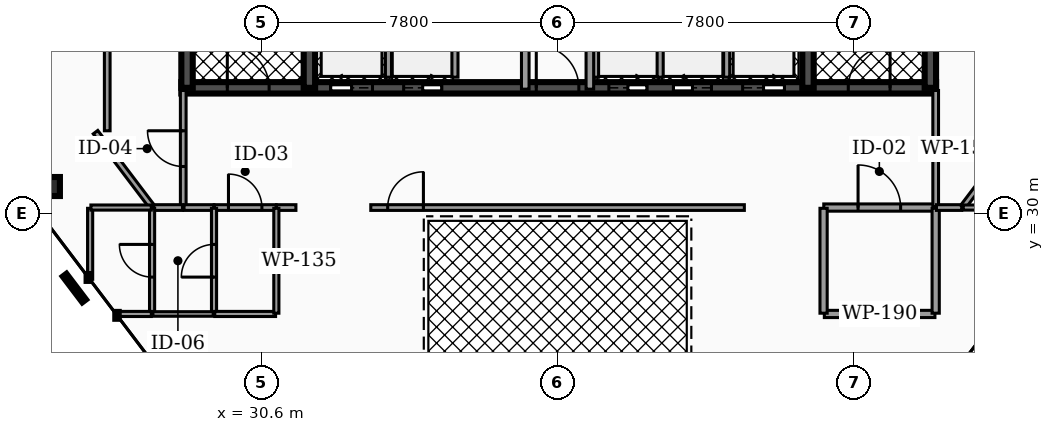
"""IFC4 building model, lengths in metres.
Left out: names, types, materials, properties, quantities, classifications, styles, units other than length and angle.
Written with IfcOpenShell. Run it as: python <this file> out.ifc"""

import sys

from ifc_helpers import new_model, si_unit, direction, frame, frame_2d, origin, origin_2d, place, context, subcontext, project, spatial, rectangle, hollow_rectangle, extrude, element, fill, save


model = new_model("IFC4")
c1 = context("Model", 3, precision=1e-05, world=origin(), true_north=direction((0.0, 1.0)))
c2 = subcontext(c1, "Body", "Model", "MODEL_VIEW")
j1 = project(units=[si_unit("LENGTHUNIT", "METRE"), si_unit("PLANEANGLEUNIT", "RADIAN")], contexts=[c1])
p1 = place(None, origin())
s1 = spatial("IfcSite", under=j1, at=p1, CompositionType="ELEMENT")
p2 = place(p1, origin())
s2 = spatial("IfcBuilding", under=s1, at=p2, CompositionType="ELEMENT")
p3 = place(p2, frame((0.0, 0.0, 249.56)))
s3 = spatial("IfcBuildingStorey", under=s2, at=p3, CompositionType="ELEMENT", Elevation=249.56)
p4 = place(p3, frame((28.5, 33.3, 0.0), z_axis=(0.0, 0.0, 1.0), x_axis=(1.0, 0.0, 0.0)))
e1 = element("IfcWall", 1, at=p4, inside=s3, PredefinedType="SHEAR", context=c2, shape_type="SweptSolid", body=[
    extrude(rectangle(XDim=19.86, YDim=0.3, at=frame_2d((9.93, 0.0))), origin(), (0.0, 0.0, 1.0), 3.05),
])
p5 = place(p4, frame((3.93, 0.0, 0.0)))
e2 = element("IfcOpeningElement", 2, at=p5, cuts=e1, PredefinedType="OPENING", context=c2, shape_type="SweptSolid", body=[
    extrude(rectangle(XDim=1.1, YDim=2.15, at=frame_2d((0.55, 1.075))), frame((0.0, 0.16, 0.0), z_axis=(0.0, -1.0, 0.0), x_axis=(1.0, 0.0, 0.0)), (0.0, 0.0, 1.0), 0.32),
])
p6 = place(p4, frame((14.77, 0.0, 0.0)))
e3 = element("IfcOpeningElement", 3, at=p6, cuts=e1, PredefinedType="OPENING", context=c2, shape_type="SweptSolid", body=[
    extrude(rectangle(XDim=1.1, YDim=2.15, at=frame_2d((0.55, 1.075))), frame((0.0, 0.16, 0.0), z_axis=(0.0, -1.0, 0.0), x_axis=(1.0, 0.0, 0.0)), (0.0, 0.0, 1.0), 0.32),
])
p7 = place(p4, frame((11.25, 0.0, 0.0)))
e4 = element("IfcOpeningElement", 4, at=p7, cuts=e1, PredefinedType="OPENING", context=c2, shape_type="SweptSolid", body=[
    extrude(rectangle(XDim=1.0, YDim=2.1, at=frame_2d((0.5, 1.05))), frame((0.0, 0.16, 0.0), z_axis=(0.0, -1.0, 0.0), x_axis=(1.0, 0.0, 0.0)), (0.0, 0.0, 1.0), 0.32),
])
p8 = place(p4, frame((12.95, 0.0, 0.0)))
e5 = element("IfcOpeningElement", 5, at=p8, cuts=e1, PredefinedType="OPENING", context=c2, shape_type="SweptSolid", body=[
    extrude(rectangle(XDim=1.0, YDim=2.1, at=frame_2d((0.5, 1.05))), frame((0.0, 0.16, 0.0), z_axis=(0.0, -1.0, 0.0), x_axis=(1.0, 0.0, 0.0)), (0.0, 0.0, 1.0), 0.32),
])
p9 = place(p4, frame((5.85, 0.0, 0.0)))
e6 = element("IfcOpeningElement", 6, at=p9, cuts=e1, PredefinedType="OPENING", context=c2, shape_type="SweptSolid", body=[
    extrude(rectangle(XDim=1.0, YDim=2.1, at=frame_2d((0.5, 1.05))), frame((0.0, 0.16, 0.0), z_axis=(0.0, -1.0, 0.0), x_axis=(1.0, 0.0, 0.0)), (0.0, 0.0, 1.0), 0.32),
])
p10 = place(p4, frame((1.21, 0.0, 0.0)))
e7 = element("IfcOpeningElement", 7, at=p10, cuts=e1, PredefinedType="OPENING", context=c2, shape_type="SweptSolid", body=[
    extrude(rectangle(XDim=1.1, YDim=2.2, at=frame_2d((0.55, 1.1))), frame((0.0, 0.16, 0.0), z_axis=(0.0, -1.0, 0.0), x_axis=(1.0, 0.0, 0.0)), (0.0, 0.0, 1.0), 0.32),
])
p11 = place(p4, frame((9.34, 0.0, 0.0)))
e8 = element("IfcOpeningElement", 8, at=p11, cuts=e1, PredefinedType="OPENING", context=c2, shape_type="SweptSolid", body=[
    extrude(rectangle(XDim=1.12, YDim=2.05, at=frame_2d((0.56, 1.025))), frame((0.0, 0.16, 0.0), z_axis=(0.0, -1.0, 0.0), x_axis=(1.0, 0.0, 0.0)), (0.0, 0.0, 1.0), 0.32),
])
p12 = place(p4, frame((17.55, 0.0, 0.0)))
e9 = element("IfcOpeningElement", 9, at=p12, cuts=e1, PredefinedType="OPENING", context=c2, shape_type="SweptSolid", body=[
    extrude(rectangle(XDim=1.1, YDim=2.2, at=frame_2d((0.55, 1.1))), frame((0.0, 0.16, 0.0), z_axis=(0.0, -1.0, 0.0), x_axis=(1.0, 0.0, 0.0)), (0.0, 0.0, 1.0), 0.32),
])
for number, where, z_axis, x_axis in (
    (10, (28.65, 33.3, 0.0), (0.0, 0.0, 1.0), (0.0, 1.0, 0.0)),
    (11, (31.87, 33.3, 0.0), (0.0, 0.0, 1.0), (0.0, 1.0, 0.0)),
    (12, (44.99, 33.3, 0.0), (0.0, 0.0, 1.0), (0.0, 1.0, 0.0)),
    (13, (48.21, 33.3, 0.0), (0.0, 0.0, 1.0), (0.0, 1.0, 0.0)),
):
    element("IfcWall", number, at=place(p3, frame(where, z_axis=z_axis, x_axis=x_axis)), inside=s3, PredefinedType="SHEAR", context=c2, shape_type="SweptSolid", body=[
        extrude(rectangle(XDim=10.1, YDim=0.3, at=frame_2d((5.05, 0.0))), origin(), (0.0, 0.0, 1.0), 3.05),
    ])
p13 = place(p3, frame((25.055, 30.704, 0.0), z_axis=(0.028068274042, 0.034145735089, 0.99902264277), x_axis=(-0.772504370212, 0.635009447177, 0.0)))
e14 = element("IfcColumn", 14, at=p13, inside=s3, PredefinedType="COLUMN", context=c2, shape_type="SweptSolid", body=[
    extrude(hollow_rectangle(XDim=0.5, YDim=0.5, WallThickness=0.025, at=origin_2d()), origin(), (0.0, 0.0, 1.0), 3.053),
])
for number, where, z_axis, x_axis in (
    (15, (33.95, 33.58, 0.0), (0.0, 0.0, 1.0), (0.0, 1.0, 0.0)),
    (16, (42.85, 33.58, 0.0), (0.0, 0.0, 1.0), (0.0, 1.0, 0.0)),
):
    element("IfcWall", number, at=place(p3, frame(where, z_axis=z_axis, x_axis=x_axis)), inside=s3, PredefinedType="SOLIDWALL", context=c2, shape_type="SweptSolid", body=[
        extrude(rectangle(XDim=2.45, YDim=0.16, at=frame_2d((1.225, 0.0))), origin(), (0.0, 0.0, 1.0), 3.05),
    ])
for number, where, z_axis, x_axis in (
    (17, (39.4, 33.58, 0.0), (0.0, 0.0, 1.0), (0.0, 1.0, 0.0)),
    (18, (41.1, 33.58, 0.0), (0.0, 0.0, 1.0), (0.0, 1.0, 0.0)),
    (19, (35.7, 33.58, 0.0), (0.0, 0.0, 1.0), (0.0, 1.0, 0.0)),
):
    element("IfcWall", number, at=place(p3, frame(where, z_axis=z_axis, x_axis=x_axis)), inside=s3, PredefinedType="SOLIDWALL", context=c2, shape_type="SweptSolid", body=[
        extrude(rectangle(XDim=2.25, YDim=0.16, at=frame_2d((1.125, 0.0))), origin(), (0.0, 0.0, 1.0), 3.05),
    ])
p14 = place(p3, frame((37.55, 33.265, 0.0), z_axis=(0.0, 0.0, 1.0), x_axis=(0.0, 1.0, 0.0)))
e20 = element("IfcWall", 20, at=p14, inside=s3, PredefinedType="PARTITIONING", context=c2, shape_type="SweptSolid", body=[
    extrude(rectangle(XDim=3.615, YDim=0.2, at=frame_2d((1.808, 0.0))), origin(), (0.0, 0.0, 1.0), 2.2),
])
p15 = place(p14, frame((1.367, 0.0, 0.0)))
e21 = element("IfcOpeningElement", 21, at=p15, cuts=e20, PredefinedType="OPENING", context=c2, shape_type="SweptSolid", body=[
    extrude(rectangle(XDim=0.88, YDim=2.05, at=frame_2d((0.44, 1.025))), frame((0.0, 0.11, 0.0), z_axis=(0.0, -1.0, 0.0), x_axis=(1.0, 0.0, 0.0)), (0.0, 0.0, 1.0), 0.22),
])
p16 = place(p3, frame((39.25, 33.265, 0.0), z_axis=(0.0, 0.0, 1.0), x_axis=(0.0, 1.0, 0.0)))
e22 = element("IfcWall", 22, at=p16, inside=s3, PredefinedType="PARTITIONING", context=c2, shape_type="SweptSolid", body=[
    extrude(rectangle(XDim=3.615, YDim=0.2, at=frame_2d((1.808, 0.0))), origin(), (0.0, 0.0, 1.0), 2.2),
])
p17 = place(p3, frame((45.405, 30.15, 0.0), z_axis=(0.0, 0.0, 1.0), x_axis=(1.0, 0.0, 0.0)))
e23 = element("IfcWall", 23, at=p17, inside=s3, PredefinedType="PARTITIONING", context=c2, shape_type="SweptSolid", body=[
    extrude(rectangle(XDim=2.925, YDim=0.19, at=frame_2d((1.462, 0.0))), origin(), (0.0, 0.0, 1.0), 2.2),
])
p18 = place(p17, frame((0.903, 0.0, 0.0)))
e24 = element("IfcOpeningElement", 24, at=p18, cuts=e23, PredefinedType="OPENING", context=c2, shape_type="SweptSolid", body=[
    extrude(rectangle(XDim=1.12, YDim=2.05, at=frame_2d((0.56, 1.025))), frame((0.0, 0.105, 0.0), z_axis=(0.0, -1.0, 0.0), x_axis=(1.0, 0.0, 0.0)), (0.0, 0.0, 1.0), 0.21),
])
p19 = place(p3, frame((28.55, 30.17, 0.0), z_axis=(0.0, 0.0, 1.0), x_axis=(0.0, 1.0, 0.0)))
e25 = element("IfcWall", 25, at=p19, inside=s3, PredefinedType="PARTITIONING", context=c2, shape_type="SweptSolid", body=[
    extrude(rectangle(XDim=3.06, YDim=0.15, at=frame_2d((1.53, 0.0))), origin(), (0.0, 0.0, 1.0), 2.2),
])
p20 = place(p19, frame((1.06, 0.0, 0.0)))
e26 = element("IfcOpeningElement", 26, at=p20, cuts=e25, PredefinedType="OPENING", context=c2, shape_type="SweptSolid", body=[
    extrude(rectangle(XDim=0.94, YDim=2.05, at=frame_2d((0.47, 1.025))), frame((0.0, 0.085, 0.0), z_axis=(0.0, -1.0, 0.0), x_axis=(1.0, 0.0, 0.0)), (0.0, 0.0, 1.0), 0.17),
])
p21 = place(p3, frame((48.35, 30.17, 0.0), z_axis=(0.0, 0.0, 1.0), x_axis=(0.0, 1.0, 0.0)))
e27 = element("IfcWall", 27, at=p21, inside=s3, PredefinedType="PARTITIONING", context=c2, shape_type="SweptSolid", body=[
    extrude(rectangle(XDim=3.06, YDim=0.15, at=frame_2d((1.53, 0.0))), origin(), (0.0, 0.0, 1.0), 2.2),
])
p22 = place(p3, frame((29.365, 30.15, 0.0), z_axis=(0.0, 0.0, 1.0), x_axis=(1.0, 0.0, 0.0)))
e28 = element("IfcWall", 28, at=p22, inside=s3, PredefinedType="PARTITIONING", context=c2, shape_type="SweptSolid", body=[
    extrude(rectangle(XDim=1.63, YDim=0.15, at=frame_2d((0.815, 0.0))), origin(), (0.0, 0.0, 1.0), 2.2),
])
p23 = place(p22, frame((0.375, 0.0, 0.0)))
e29 = element("IfcOpeningElement", 29, at=p23, cuts=e28, PredefinedType="OPENING", context=c2, shape_type="SweptSolid", body=[
    extrude(rectangle(XDim=0.88, YDim=2.05, at=frame_2d((0.44, 1.025))), frame((0.0, 0.085, 0.0), z_axis=(0.0, -1.0, 0.0), x_axis=(1.0, 0.0, 0.0)), (0.0, 0.0, 1.0), 0.17),
])
p24 = place(p3, frame((28.57, 30.15, 0.0), z_axis=(0.0, 0.0, 1.0), x_axis=(1.0, 0.0, 0.0)))
e30 = element("IfcWall", 30, at=p24, inside=s3, PredefinedType="PARTITIONING", context=c2, shape_type="SweptSolid", body=[
    extrude(rectangle(XDim=0.785, YDim=0.15, at=frame_2d((0.393, 0.0))), origin(), (0.0, 0.0, 1.0), 2.2),
])
p25 = place(p3, frame((33.485, 30.15, 0.0), z_axis=(0.0, 0.0, 1.0), x_axis=(1.0, 0.0, 0.0)))
e31 = element("IfcWall", 31, at=p25, inside=s3, PredefinedType="PARTITIONING", context=c2, shape_type="SweptSolid", body=[
    extrude(rectangle(XDim=9.83, YDim=0.15, at=frame_2d((4.915, 0.0))), origin(), (0.0, 0.0, 1.0), 2.2),
])
p26 = place(p25, frame((0.445, 0.0, 0.0)))
e32 = element("IfcOpeningElement", 32, at=p26, cuts=e31, PredefinedType="OPENING", context=c2, shape_type="SweptSolid", body=[
    extrude(rectangle(XDim=0.94, YDim=2.05, at=frame_2d((0.47, 1.025))), frame((0.0, 0.085, 0.0), z_axis=(0.0, -1.0, 0.0), x_axis=(1.0, 0.0, 0.0)), (0.0, 0.0, 1.0), 0.17),
])
p27 = place(p3, frame((31.005, 30.15, 0.0), z_axis=(0.0, 0.0, 1.0), x_axis=(1.0, 0.0, 0.0)))
e33 = element("IfcWall", 33, at=p27, inside=s3, PredefinedType="PARTITIONING", context=c2, shape_type="SweptSolid", body=[
    extrude(rectangle(XDim=0.51, YDim=0.15, at=frame_2d((0.255, 0.0))), origin(), (0.0, 0.0, 1.0), 2.2),
])
p28 = place(p3, frame((45.42, 27.35, 0.0), z_axis=(0.0, 0.0, 1.0), x_axis=(1.0, 0.0, 0.0)))
e34 = element("IfcWall", 34, at=p28, inside=s3, PredefinedType="PARTITIONING", context=c2, shape_type="SweptSolid", body=[
    extrude(rectangle(XDim=2.91, YDim=0.19, at=frame_2d((1.455, 0.0))), origin(), (0.0, 0.0, 1.0), 2.2),
])
for number, where, z_axis, x_axis in (
    (35, (45.4, 27.37, 0.0), (0.0, 0.0, 1.0), (0.0, 1.0, 0.0)),
    (36, (48.35, 27.37, 0.0), (0.0, 0.0, 1.0), (0.0, 1.0, 0.0)),
):
    element("IfcWall", number, at=place(p3, frame(where, z_axis=z_axis, x_axis=x_axis)), inside=s3, PredefinedType="PARTITIONING", context=c2, shape_type="SweptSolid", body=[
        extrude(rectangle(XDim=2.76, YDim=0.19, at=frame_2d((1.38, 0.0))), origin(), (0.0, 0.0, 1.0), 2.2),
    ])
p29 = place(p3, frame((27.765, 30.15, 0.0), z_axis=(0.0, 0.0, 1.0), x_axis=(1.0, 0.0, 0.0)))
e37 = element("IfcWall", 37, at=p29, inside=s3, PredefinedType="PARTITIONING", context=c2, shape_type="SweptSolid", body=[
    extrude(rectangle(XDim=0.765, YDim=0.15, at=frame_2d((0.383, 0.0))), origin(), (0.0, 0.0, 1.0), 2.2),
])
p30 = place(p3, frame((48.37, 30.15, 0.0), z_axis=(0.0, 0.0, 1.0), x_axis=(1.0, 0.0, 0.0)))
e38 = element("IfcWall", 38, at=p30, inside=s3, PredefinedType="PARTITIONING", context=c2, shape_type="SweptSolid", body=[
    extrude(rectangle(XDim=0.665, YDim=0.15, at=frame_2d((0.333, 0.0))), origin(), (0.0, 0.0, 1.0), 2.2),
])
p31 = place(p3, frame((26.242, 32.134, 0.0), z_axis=(0.0, 0.0, 1.0), x_axis=(0.603806281462, -0.797131089889, 0.0)))
e39 = element("IfcWall", 39, at=p31, inside=s3, PredefinedType="PARTITIONING", context=c2, shape_type="SweptSolid", body=[
    extrude(rectangle(XDim=2.469, YDim=0.15, at=frame_2d((1.234, 0.0))), origin(), (0.0, 0.0, 1.0), 2.2),
])
p32 = place(p3, frame((26.55, 32.17, 0.0), z_axis=(0.0, 0.0, 1.0), x_axis=(0.0, 1.0, 0.0)))
e40 = element("IfcWall", 40, at=p32, inside=s3, PredefinedType="PARTITIONING", context=c2, shape_type="SweptSolid", body=[
    extrude(rectangle(XDim=11.38, YDim=0.15, at=frame_2d((5.69, 0.0))), origin(), (0.0, 0.0, 1.0), 2.2),
])
p33 = place(p32, frame((5.22, 0.0, 0.0)))
e41 = element("IfcOpeningElement", 41, at=p33, cuts=e40, PredefinedType="OPENING", context=c2, shape_type="SweptSolid", body=[
    extrude(rectangle(XDim=0.94, YDim=2.05, at=frame_2d((0.47, 1.025))), frame((0.0, 0.085, 0.0), z_axis=(0.0, -1.0, 0.0), x_axis=(1.0, 0.0, 0.0)), (0.0, 0.0, 1.0), 0.17),
])
p34 = place(p3, frame((49.067, 30.166, 0.0), z_axis=(0.0, 0.0, 1.0), x_axis=(0.603916229015, 0.797047795513, 0.0)))
e42 = element("IfcWall", 42, at=p34, inside=s3, PredefinedType="PARTITIONING", context=c2, shape_type="SweptSolid", body=[
    extrude(rectangle(XDim=2.489, YDim=0.15, at=frame_2d((1.245, 0.0))), origin(), (0.0, 0.0, 1.0), 2.2),
])
p35 = place(p3, frame((29.36, 27.37, 0.0), z_axis=(0.0, 0.0, 1.0), x_axis=(0.0, 1.0, 0.0)))
e43 = element("IfcWall", 43, at=p35, inside=s3, PredefinedType="PARTITIONING", context=c2, shape_type="SweptSolid", body=[
    extrude(rectangle(XDim=2.76, YDim=0.135, at=frame_2d((1.38, 0.0))), origin(), (0.0, 0.0, 1.0), 2.2),
])
p36 = place(p35, frame((0.95, 0.0, 0.0)))
e44 = element("IfcOpeningElement", 44, at=p36, cuts=e43, PredefinedType="OPENING", context=c2, shape_type="SweptSolid", body=[
    extrude(rectangle(XDim=0.86, YDim=2.05, at=frame_2d((0.43, 1.025))), frame((0.0, 0.077, 0.0), z_axis=(0.0, -1.0, 0.0), x_axis=(1.0, 0.0, 0.0)), (0.0, 0.0, 1.0), 0.155),
])
p37 = place(p3, frame((29.38, 27.35, 0.0), z_axis=(0.0, 0.0, 1.0), x_axis=(1.0, 0.0, 0.0)))
e45 = element("IfcWall", 45, at=p37, inside=s3, PredefinedType="PARTITIONING", context=c2, shape_type="SweptSolid", body=[
    extrude(rectangle(XDim=1.6, YDim=0.135, at=frame_2d((0.8, 0.0))), origin(), (0.0, 0.0, 1.0), 2.2),
])
p38 = place(p3, frame((31.0, 27.37, 0.0), z_axis=(0.0, 0.0, 1.0), x_axis=(0.0, 1.0, 0.0)))
e46 = element("IfcWall", 46, at=p38, inside=s3, PredefinedType="PARTITIONING", context=c2, shape_type="SweptSolid", body=[
    extrude(rectangle(XDim=2.76, YDim=0.135, at=frame_2d((1.38, 0.0))), origin(), (0.0, 0.0, 1.0), 2.2),
])
p39 = place(p3, frame((27.73, 27.37, 0.0), z_axis=(0.0, 0.0, 1.0), x_axis=(0.0, 1.0, 0.0)))
e47 = element("IfcWall", 47, at=p39, inside=s3, PredefinedType="PARTITIONING", context=c2, shape_type="SweptSolid", body=[
    extrude(rectangle(XDim=2.76, YDim=0.135, at=frame_2d((1.38, 0.0))), origin(), (0.0, 0.0, 1.0), 2.2),
])
p40 = place(p39, frame((0.95, 0.0, 0.0)))
e48 = element("IfcOpeningElement", 48, at=p40, cuts=e47, PredefinedType="OPENING", context=c2, shape_type="SweptSolid", body=[
    extrude(rectangle(XDim=0.86, YDim=2.05, at=frame_2d((0.43, 1.025))), frame((0.0, 0.077, 0.0), z_axis=(0.0, -1.0, 0.0), x_axis=(1.0, 0.0, 0.0)), (0.0, 0.0, 1.0), 0.155),
])
p41 = place(p3, frame((26.795, 27.35, 0.0), z_axis=(0.0, 0.0, 1.0), x_axis=(1.0, 0.0, 0.0)))
e49 = element("IfcWall", 49, at=p41, inside=s3, PredefinedType="PARTITIONING", context=c2, shape_type="SweptSolid", body=[
    extrude(rectangle(XDim=0.915, YDim=0.135, at=frame_2d((0.458, 0.0))), origin(), (0.0, 0.0, 1.0), 2.2),
])
p42 = place(p3, frame((26.1, 28.262, 0.0), z_axis=(0.0, 0.0, 1.0), x_axis=(0.0, 1.0, 0.0)))
e50 = element("IfcWall", 50, at=p42, inside=s3, PredefinedType="PARTITIONING", context=c2, shape_type="SweptSolid", body=[
    extrude(rectangle(XDim=1.868, YDim=0.135, at=frame_2d((0.934, 0.0))), origin(), (0.0, 0.0, 1.0), 2.2),
])
p43 = place(p3, frame((26.12, 30.15, 0.0), z_axis=(0.0, 0.0, 1.0), x_axis=(1.0, 0.0, 0.0)))
e51 = element("IfcWall", 51, at=p43, inside=s3, PredefinedType="PARTITIONING", context=c2, shape_type="SweptSolid", body=[
    extrude(rectangle(XDim=1.59, YDim=0.135, at=frame_2d((0.795, 0.0))), origin(), (0.0, 0.0, 1.0), 2.2),
])
p44 = place(p3, frame((27.75, 27.35, 0.0), z_axis=(0.0, 0.0, 1.0), x_axis=(1.0, 0.0, 0.0)))
e52 = element("IfcWall", 52, at=p44, inside=s3, PredefinedType="PARTITIONING", context=c2, shape_type="SweptSolid", body=[
    extrude(rectangle(XDim=1.59, YDim=0.12, at=frame_2d((0.795, 0.0))), origin(), (0.0, 0.0, 1.0), 2.2),
])
p45 = place(p3, frame((49.075, 30.15, 0.0), z_axis=(0.0, 0.0, 1.0), x_axis=(1.0, 0.0, 0.0)))
e53 = element("IfcWall", 53, at=p45, inside=s3, PredefinedType="PARTITIONING", context=c2, shape_type="SweptSolid", body=[
    extrude(rectangle(XDim=2.225, YDim=0.135, at=frame_2d((1.112, 0.0))), origin(), (0.0, 0.0, 1.0), 2.2),
])
p46 = place(p5, origin())
e54 = element("IfcDoor", 54, at=p46, inside=s3, OperationType="SLIDING_TO_LEFT", PredefinedType="DOOR", context=c2, shape_type="SweptSolid", body=[
    extrude(rectangle(XDim=1.1, YDim=2.15, at=frame_2d((0.55, 1.075))), frame((0.0, 0.025, 0.0), z_axis=(0.0, -1.0, 0.0), x_axis=(1.0, 0.0, 0.0)), (0.0, 0.0, 1.0), 0.05),
])
fill(e2, e54)
p47 = place(p6, origin())
e55 = element("IfcDoor", 55, at=p47, inside=s3, OperationType="SLIDING_TO_RIGHT", PredefinedType="DOOR", context=c2, shape_type="SweptSolid", body=[
    extrude(rectangle(XDim=1.1, YDim=2.15, at=frame_2d((0.55, 1.075))), frame((0.0, 0.025, 0.0), z_axis=(0.0, -1.0, 0.0), x_axis=(1.0, 0.0, 0.0)), (0.0, 0.0, 1.0), 0.05),
])
fill(e3, e55)
p48 = place(p7, origin())
e56 = element("IfcDoor", 56, at=p48, inside=s3, OperationType="SLIDING_TO_RIGHT", PredefinedType="DOOR", context=c2, shape_type="SweptSolid", body=[
    extrude(rectangle(XDim=1.0, YDim=2.1, at=frame_2d((0.5, 1.05))), frame((0.0, 0.025, 0.0), z_axis=(0.0, -1.0, 0.0), x_axis=(1.0, 0.0, 0.0)), (0.0, 0.0, 1.0), 0.05),
])
fill(e4, e56)
p49 = place(p8, origin())
e57 = element("IfcDoor", 57, at=p49, inside=s3, OperationType="SLIDING_TO_LEFT", PredefinedType="DOOR", context=c2, shape_type="SweptSolid", body=[
    extrude(rectangle(XDim=1.0, YDim=2.1, at=frame_2d((0.5, 1.05))), frame((0.0, 0.025, 0.0), z_axis=(0.0, -1.0, 0.0), x_axis=(1.0, 0.0, 0.0)), (0.0, 0.0, 1.0), 0.05),
])
fill(e5, e57)
p50 = place(p9, origin())
e58 = element("IfcDoor", 58, at=p50, inside=s3, OperationType="SLIDING_TO_RIGHT", PredefinedType="DOOR", context=c2, shape_type="SweptSolid", body=[
    extrude(rectangle(XDim=1.0, YDim=2.1, at=frame_2d((0.5, 1.05))), frame((0.0, 0.025, 0.0), z_axis=(0.0, -1.0, 0.0), x_axis=(1.0, 0.0, 0.0)), (0.0, 0.0, 1.0), 0.05),
])
fill(e6, e58)
p51 = place(p10, origin())
e59 = element("IfcDoor", 59, at=p51, inside=s3, OperationType="SINGLE_SWING_LEFT", PredefinedType="DOOR", context=c2, shape_type="SweptSolid", body=[
    extrude(rectangle(XDim=1.1, YDim=2.2, at=frame_2d((0.55, 1.1))), frame((0.0, 0.025, 0.0), z_axis=(0.0, -1.0, 0.0), x_axis=(1.0, 0.0, 0.0)), (0.0, 0.0, 1.0), 0.05),
])
fill(e7, e59)
p52 = place(p11, origin())
e60 = element("IfcDoor", 60, at=p52, inside=s3, OperationType="SINGLE_SWING_LEFT", PredefinedType="DOOR", context=c2, shape_type="SweptSolid", body=[
    extrude(rectangle(XDim=1.12, YDim=2.05, at=frame_2d((0.56, 1.025))), frame((0.0, 0.025, 0.0), z_axis=(0.0, -1.0, 0.0), x_axis=(1.0, 0.0, 0.0)), (0.0, 0.0, 1.0), 0.05),
])
fill(e8, e60)
p53 = place(p12, origin())
e61 = element("IfcDoor", 61, at=p53, inside=s3, OperationType="SINGLE_SWING_RIGHT", PredefinedType="DOOR", context=c2, shape_type="SweptSolid", body=[
    extrude(rectangle(XDim=1.1, YDim=2.2, at=frame_2d((0.55, 1.1))), frame((0.0, 0.025, 0.0), z_axis=(0.0, -1.0, 0.0), x_axis=(1.0, 0.0, 0.0)), (0.0, 0.0, 1.0), 0.05),
])
fill(e9, e61)
p54 = place(p18, origin())
e62 = element("IfcDoor", 62, at=p54, inside=s3, OperationType="SINGLE_SWING_LEFT", PredefinedType="DOOR", context=c2, shape_type="SweptSolid", body=[
    extrude(rectangle(XDim=1.12, YDim=2.05, at=frame_2d((0.56, 1.025))), frame((0.0, 0.025, 0.0), z_axis=(0.0, -1.0, 0.0), x_axis=(1.0, 0.0, 0.0)), (0.0, 0.0, 1.0), 0.05),
])
fill(e24, e62)
p55 = place(p20, origin())
e63 = element("IfcDoor", 63, at=p55, inside=s3, OperationType="SINGLE_SWING_RIGHT", PredefinedType="DOOR", context=c2, shape_type="SweptSolid", body=[
    extrude(rectangle(XDim=0.94, YDim=2.05, at=frame_2d((0.47, 1.025))), frame((0.0, 0.025, 0.0), z_axis=(0.0, -1.0, 0.0), x_axis=(1.0, 0.0, 0.0)), (0.0, 0.0, 1.0), 0.05),
])
fill(e26, e63)
p56 = place(p23, origin())
e64 = element("IfcDoor", 64, at=p56, inside=s3, OperationType="SINGLE_SWING_LEFT", PredefinedType="DOOR", context=c2, shape_type="SweptSolid", body=[
    extrude(rectangle(XDim=0.88, YDim=2.05, at=frame_2d((0.44, 1.025))), frame((0.0, 0.025, 0.0), z_axis=(0.0, -1.0, 0.0), x_axis=(1.0, 0.0, 0.0)), (0.0, 0.0, 1.0), 0.05),
])
fill(e29, e64)
p57 = place(p26, origin())
e65 = element("IfcDoor", 65, at=p57, inside=s3, OperationType="SINGLE_SWING_RIGHT", PredefinedType="DOOR", context=c2, shape_type="SweptSolid", body=[
    extrude(rectangle(XDim=0.94, YDim=2.05, at=frame_2d((0.47, 1.025))), frame((0.0, 0.025, 0.0), z_axis=(0.0, -1.0, 0.0), x_axis=(1.0, 0.0, 0.0)), (0.0, 0.0, 1.0), 0.05),
])
fill(e32, e65)
p58 = place(p36, origin())
e66 = element("IfcDoor", 66, at=p58, inside=s3, OperationType="SINGLE_SWING_LEFT", PredefinedType="DOOR", context=c2, shape_type="SweptSolid", body=[
    extrude(rectangle(XDim=0.86, YDim=2.05, at=frame_2d((0.43, 1.025))), frame((0.0, 0.025, 0.0), z_axis=(0.0, -1.0, 0.0), x_axis=(1.0, 0.0, 0.0)), (0.0, 0.0, 1.0), 0.05),
])
fill(e44, e66)
p59 = place(p40, origin())
e67 = element("IfcDoor", 67, at=p59, inside=s3, OperationType="SINGLE_SWING_RIGHT", PredefinedType="DOOR", context=c2, shape_type="SweptSolid", body=[
    extrude(rectangle(XDim=0.86, YDim=2.05, at=frame_2d((0.43, 1.025))), frame((0.0, 0.025, 0.0), z_axis=(0.0, -1.0, 0.0), x_axis=(1.0, 0.0, 0.0)), (0.0, 0.0, 1.0), 0.05),
])
fill(e48, e67)
save(model, sys.argv[1])
